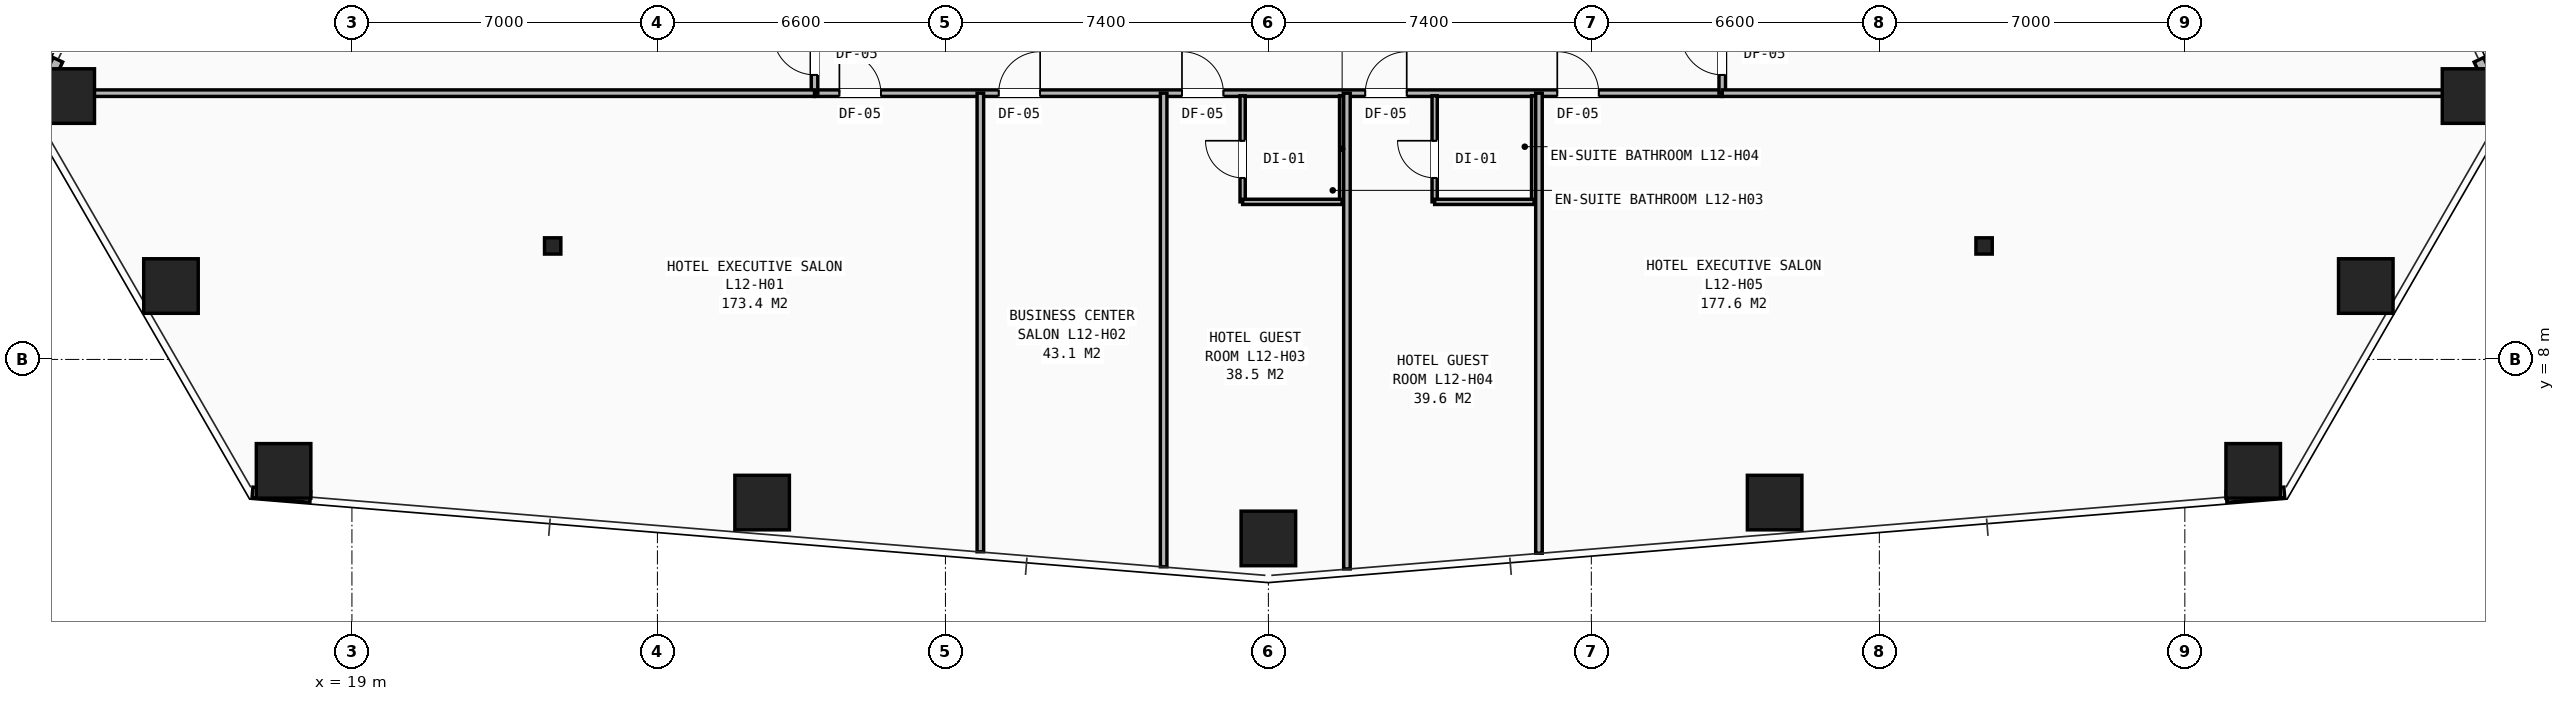
"""IFC4 building model, lengths in metres.
Left out: names, types, materials, properties, quantities, classifications, styles, units other than length and angle.
Written with IfcOpenShell. Run it as: python <this file> out.ifc"""

import sys

from ifc_helpers import new_model, si_unit, direction, frame, frame_2d, origin, origin_2d, place, context, subcontext, project, spatial, rectangle, hollow_rectangle, i_section, extrude, element, fill, save


model = new_model("IFC4")
c1 = context("Model", 3, precision=1e-05, world=origin(), true_north=direction((0.0, 1.0)))
c2 = subcontext(c1, "Body", "Model", "MODEL_VIEW")
j1 = project(units=[si_unit("LENGTHUNIT", "METRE"), si_unit("PLANEANGLEUNIT", "RADIAN")], contexts=[c1])
p1 = place(None, origin())
s1 = spatial("IfcSite", under=j1, at=p1, CompositionType="ELEMENT")
p2 = place(p1, origin())
s2 = spatial("IfcBuilding", under=s1, at=p2, CompositionType="ELEMENT")
p3 = place(p2, frame((0.0, 0.0, 46.4)))
s3 = spatial("IfcBuildingStorey", under=s2, at=p3, CompositionType="ELEMENT", Elevation=46.4)
for number, where, z_axis, x_axis in (
    (1, (23.6, 10.6, 0.0), (0.0, 0.0, 1.0), (1.0, 0.0, 0.0)),
    (2, (56.4, 10.6, 0.0), (0.0, 0.0, 1.0), (1.0, 0.0, 0.0)),
):
    element("IfcColumn", number, at=place(p3, frame(where, z_axis=z_axis, x_axis=x_axis)), inside=s3, PredefinedType="COLUMN", context=c2, shape_type="SweptSolid", body=[
        extrude(i_section(OverallWidth=0.374, OverallDepth=0.372, WebThickness=0.016, FlangeThickness=0.026, at=origin_2d()), origin(), (0.0, 0.0, 1.0), 3.2),
    ])
for number, where, z_axis, x_axis in (
    (3, (12.476, 14.033, 0.0), (0.0, 0.0, 1.0), (1.0, 0.0, 0.0)),
    (4, (14.853, 9.681, 0.0), (0.0, 0.0, 1.0), (1.0, 0.0, 0.0)),
    (5, (17.434, 5.447, 0.0), (0.0, 0.0, 1.0), (1.0, 0.0, 0.0)),
    (6, (28.399, 4.721, 0.0), (0.0, 0.0, 1.0), (1.0, 0.0, 0.0)),
    (7, (40.0, 3.899, 0.0), (0.0, 0.0, 1.0), (1.0, 0.0, 0.0)),
    (8, (51.601, 4.721, 0.0), (0.0, 0.0, 1.0), (1.0, 0.0, 0.0)),
    (9, (62.566, 5.447, 0.0), (0.0, 0.0, 1.0), (1.0, 0.0, 0.0)),
    (10, (65.147, 9.681, 0.0), (0.0, 0.0, 1.0), (1.0, 0.0, 0.0)),
    (11, (67.524, 14.033, 0.0), (0.0, 0.0, 1.0), (1.0, 0.0, 0.0)),
):
    element("IfcColumn", number, at=place(p3, frame(where, z_axis=z_axis, x_axis=x_axis)), inside=s3, PredefinedType="COLUMN", context=c2, shape_type="SweptSolid", body=[
        extrude(hollow_rectangle(XDim=1.25, YDim=1.25, WallThickness=0.08, at=origin_2d()), origin(), (0.0, 0.0, 1.0), 3.2),
    ])
p4 = place(p3, frame((12.263, 14.864, 0.0), z_axis=(0.0, 0.0, 1.0), x_axis=(-0.427644283084, -0.903947104175, 0.0)))
e12 = element("IfcWall", 12, at=p4, inside=s3, PredefinedType="SHEAR", context=c2, shape_type="SweptSolid", body=[
    extrude(rectangle(XDim=1.33, YDim=0.24, at=frame_2d((0.665, 0.0))), origin(), (0.0, 0.0, 1.0), 2.263),
])
for number, where, z_axis, x_axis in (
    (13, (16.721, 4.955, 0.0), (0.0, 0.0, 1.0), (0.997, -0.082, 0.0)),
    (14, (61.954, 4.847, 0.0), (0.0, 0.0, 1.0), (0.997, 0.082, 0.0)),
):
    element("IfcWall", number, at=place(p3, frame(where, z_axis=z_axis, x_axis=x_axis)), inside=s3, PredefinedType="SHEAR", context=c2, shape_type="SweptSolid", body=[
        extrude(rectangle(XDim=1.329, YDim=0.24, at=frame_2d((0.665, 0.0))), origin(), (0.0, 0.0, 1.0), 2.263),
    ])
p5 = place(p3, frame((68.306, 13.662, 0.0), z_axis=(0.0, 0.0, 1.0), x_axis=(-0.427644283084, 0.903947104175, 0.0)))
e15 = element("IfcWall", 15, at=p5, inside=s3, PredefinedType="SHEAR", context=c2, shape_type="SweptSolid", body=[
    extrude(rectangle(XDim=1.33, YDim=0.24, at=frame_2d((0.665, 0.0))), origin(), (0.0, 0.0, 1.0), 2.263),
])
p6 = place(p3, frame((29.6, 14.1, 0.0), z_axis=(0.0, 0.0, 1.0), x_axis=(1.0, 0.0, 0.0)))
e16 = element("IfcWall", 16, at=p6, inside=s3, PredefinedType="PARTITIONING", context=c2, shape_type="SweptSolid", body=[
    extrude(rectangle(XDim=20.8, YDim=0.15, at=frame_2d((10.4, 0.0))), origin(), (0.0, 0.0, 1.0), 2.431),
])
p7 = place(p6, frame((0.57, 0.0, 0.0)))
e17 = element("IfcOpeningElement", 17, at=p7, cuts=e16, PredefinedType="OPENING", context=c2, shape_type="SweptSolid", body=[
    extrude(rectangle(XDim=0.95, YDim=2.1, at=frame_2d((0.475, 1.05))), frame((0.0, 0.085, 0.0), z_axis=(0.0, -1.0, 0.0), x_axis=(1.0, 0.0, 0.0)), (0.0, 0.0, 1.0), 0.17),
])
p8 = place(p6, frame((4.22, 0.0, 0.0)))
e18 = element("IfcOpeningElement", 18, at=p8, cuts=e16, PredefinedType="OPENING", context=c2, shape_type="SweptSolid", body=[
    extrude(rectangle(XDim=0.95, YDim=2.1, at=frame_2d((0.475, 1.05))), frame((0.0, 0.085, 0.0), z_axis=(0.0, -1.0, 0.0), x_axis=(1.0, 0.0, 0.0)), (0.0, 0.0, 1.0), 0.17),
])
p9 = place(p6, frame((8.42, 0.0, 0.0)))
e19 = element("IfcOpeningElement", 19, at=p9, cuts=e16, PredefinedType="OPENING", context=c2, shape_type="SweptSolid", body=[
    extrude(rectangle(XDim=0.95, YDim=2.1, at=frame_2d((0.475, 1.05))), frame((0.0, 0.085, 0.0), z_axis=(0.0, -1.0, 0.0), x_axis=(1.0, 0.0, 0.0)), (0.0, 0.0, 1.0), 0.17),
])
p10 = place(p6, frame((12.62, 0.0, 0.0)))
e20 = element("IfcOpeningElement", 20, at=p10, cuts=e16, PredefinedType="OPENING", context=c2, shape_type="SweptSolid", body=[
    extrude(rectangle(XDim=0.95, YDim=2.1, at=frame_2d((0.475, 1.05))), frame((0.0, 0.085, 0.0), z_axis=(0.0, -1.0, 0.0), x_axis=(1.0, 0.0, 0.0)), (0.0, 0.0, 1.0), 0.17),
])
p11 = place(p6, frame((17.02, 0.0, 0.0)))
e21 = element("IfcOpeningElement", 21, at=p11, cuts=e16, PredefinedType="OPENING", context=c2, shape_type="SweptSolid", body=[
    extrude(rectangle(XDim=0.95, YDim=2.1, at=frame_2d((0.475, 1.05))), frame((0.0, 0.085, 0.0), z_axis=(0.0, -1.0, 0.0), x_axis=(1.0, 0.0, 0.0)), (0.0, 0.0, 1.0), 0.17),
])
p12 = place(p3, frame((29.6, 14.1, 0.0), z_axis=(0.0, 0.0, 1.0), x_axis=(0.0, 1.0, 0.0)))
e22 = element("IfcWall", 22, at=p12, inside=s3, PredefinedType="PARTITIONING", context=c2, shape_type="SweptSolid", body=[
    extrude(rectangle(XDim=21.9, YDim=0.15, at=frame_2d((10.95, 0.0))), origin(), (0.0, 0.0, 1.0), 2.431),
])
p13 = place(p12, frame((0.42, 0.0, 0.0)))
e23 = element("IfcOpeningElement", 23, at=p13, cuts=e22, PredefinedType="OPENING", context=c2, shape_type="SweptSolid", body=[
    extrude(rectangle(XDim=0.95, YDim=2.1, at=frame_2d((0.475, 1.05))), frame((0.0, 0.085, 0.0), z_axis=(0.0, -1.0, 0.0), x_axis=(1.0, 0.0, 0.0)), (0.0, 0.0, 1.0), 0.17),
])
p14 = place(p12, frame((5.12, 0.0, 0.0)))
e24 = element("IfcOpeningElement", 24, at=p14, cuts=e22, PredefinedType="OPENING", context=c2, shape_type="SweptSolid", body=[
    extrude(rectangle(XDim=0.95, YDim=2.1, at=frame_2d((0.475, 1.05))), frame((0.0, 0.085, 0.0), z_axis=(0.0, -1.0, 0.0), x_axis=(1.0, 0.0, 0.0)), (0.0, 0.0, 1.0), 0.17),
])
p15 = place(p12, frame((10.12, 0.0, 0.0)))
e25 = element("IfcOpeningElement", 25, at=p15, cuts=e22, PredefinedType="OPENING", context=c2, shape_type="SweptSolid", body=[
    extrude(rectangle(XDim=0.95, YDim=2.1, at=frame_2d((0.475, 1.05))), frame((0.0, 0.085, 0.0), z_axis=(0.0, -1.0, 0.0), x_axis=(1.0, 0.0, 0.0)), (0.0, 0.0, 1.0), 0.17),
])
p16 = place(p12, frame((16.12, 0.0, 0.0)))
e26 = element("IfcOpeningElement", 26, at=p16, cuts=e22, PredefinedType="OPENING", context=c2, shape_type="SweptSolid", body=[
    extrude(rectangle(XDim=0.95, YDim=2.1, at=frame_2d((0.475, 1.05))), frame((0.0, 0.085, 0.0), z_axis=(0.0, -1.0, 0.0), x_axis=(1.0, 0.0, 0.0)), (0.0, 0.0, 1.0), 0.17),
])
p17 = place(p3, frame((50.4, 14.1, 0.0), z_axis=(0.0, 0.0, 1.0), x_axis=(0.0, 1.0, 0.0)))
e27 = element("IfcWall", 27, at=p17, inside=s3, PredefinedType="PARTITIONING", context=c2, shape_type="SweptSolid", body=[
    extrude(rectangle(XDim=21.9, YDim=0.15, at=frame_2d((10.95, 0.0))), origin(), (0.0, 0.0, 1.0), 2.431),
])
p18 = place(p17, frame((0.42, 0.0, 0.0)))
e28 = element("IfcOpeningElement", 28, at=p18, cuts=e27, PredefinedType="OPENING", context=c2, shape_type="SweptSolid", body=[
    extrude(rectangle(XDim=0.95, YDim=2.1, at=frame_2d((0.475, 1.05))), frame((0.0, 0.085, 0.0), z_axis=(0.0, -1.0, 0.0), x_axis=(1.0, 0.0, 0.0)), (0.0, 0.0, 1.0), 0.17),
])
p19 = place(p17, frame((5.72, 0.0, 0.0)))
e29 = element("IfcOpeningElement", 29, at=p19, cuts=e27, PredefinedType="OPENING", context=c2, shape_type="SweptSolid", body=[
    extrude(rectangle(XDim=0.95, YDim=2.1, at=frame_2d((0.475, 1.05))), frame((0.0, 0.085, 0.0), z_axis=(0.0, -1.0, 0.0), x_axis=(1.0, 0.0, 0.0)), (0.0, 0.0, 1.0), 0.17),
])
p20 = place(p17, frame((11.12, 0.0, 0.0)))
e30 = element("IfcOpeningElement", 30, at=p20, cuts=e27, PredefinedType="OPENING", context=c2, shape_type="SweptSolid", body=[
    extrude(rectangle(XDim=0.95, YDim=2.1, at=frame_2d((0.475, 1.05))), frame((0.0, 0.085, 0.0), z_axis=(0.0, -1.0, 0.0), x_axis=(1.0, 0.0, 0.0)), (0.0, 0.0, 1.0), 0.17),
])
p21 = place(p17, frame((16.72, 0.0, 0.0)))
e31 = element("IfcOpeningElement", 31, at=p21, cuts=e27, PredefinedType="OPENING", context=c2, shape_type="SweptSolid", body=[
    extrude(rectangle(XDim=0.95, YDim=2.1, at=frame_2d((0.475, 1.05))), frame((0.0, 0.085, 0.0), z_axis=(0.0, -1.0, 0.0), x_axis=(1.0, 0.0, 0.0)), (0.0, 0.0, 1.0), 0.17),
])
p22 = place(p3, frame((33.4, 3.594, 0.0), z_axis=(0.0, 0.0, 1.0), x_axis=(0.0, 1.0, 0.0)))
e32 = element("IfcWall", 32, at=p22, inside=s3, PredefinedType="PARTITIONING", context=c2, shape_type="SweptSolid", body=[
    extrude(rectangle(XDim=10.507, YDim=0.15, at=frame_2d((5.253, 0.0))), origin(), (0.0, 0.0, 1.0), 2.268),
])
p23 = place(p3, frame((37.6, 3.25, 0.0), z_axis=(0.0, 0.0, 1.0), x_axis=(0.0, 1.0, 0.0)))
e33 = element("IfcWall", 33, at=p23, inside=s3, PredefinedType="PARTITIONING", context=c2, shape_type="SweptSolid", body=[
    extrude(rectangle(XDim=10.851, YDim=0.15, at=frame_2d((5.425, 0.0))), origin(), (0.0, 0.0, 1.0), 2.268),
])
p24 = place(p3, frame((39.41, 11.61, 0.0), z_axis=(0.0, 0.0, 1.0), x_axis=(0.0, 1.0, 0.0)))
e34 = element("IfcWall", 34, at=p24, inside=s3, PredefinedType="PARTITIONING", context=c2, shape_type="SweptSolid", body=[
    extrude(rectangle(XDim=2.43, YDim=0.12, at=frame_2d((1.215, 0.0))), origin(), (0.0, 0.0, 1.0), 2.98),
])
p25 = place(p24, frame((0.55, 0.0, 0.0)))
e35 = element("IfcOpeningElement", 35, at=p25, cuts=e34, PredefinedType="OPENING", context=c2, shape_type="SweptSolid", body=[
    extrude(rectangle(XDim=0.85, YDim=2.05, at=frame_2d((0.425, 1.025))), frame((0.0, 0.07, 0.0), z_axis=(0.0, -1.0, 0.0), x_axis=(1.0, 0.0, 0.0)), (0.0, 0.0, 1.0), 0.14),
])
p26 = place(p3, frame((41.69, 11.61, 0.0), z_axis=(0.0, 0.0, 1.0), x_axis=(0.0, 1.0, 0.0)))
e36 = element("IfcWall", 36, at=p26, inside=s3, PredefinedType="PARTITIONING", context=c2, shape_type="SweptSolid", body=[
    extrude(rectangle(XDim=2.43, YDim=0.12, at=frame_2d((1.215, 0.0))), origin(), (0.0, 0.0, 1.0), 2.98),
])
p27 = place(p3, frame((39.41, 11.61, 0.0), z_axis=(0.0, 0.0, 1.0), x_axis=(1.0, 0.0, 0.0)))
e37 = element("IfcWall", 37, at=p27, inside=s3, PredefinedType="PARTITIONING", context=c2, shape_type="SweptSolid", body=[
    extrude(rectangle(XDim=2.28, YDim=0.12, at=frame_2d((1.14, 0.0))), origin(), (0.0, 0.0, 1.0), 2.98),
])
p28 = place(p3, frame((41.8, 3.2, 0.0), z_axis=(0.0, 0.0, 1.0), x_axis=(0.0, 1.0, 0.0)))
e38 = element("IfcWall", 38, at=p28, inside=s3, PredefinedType="PARTITIONING", context=c2, shape_type="SweptSolid", body=[
    extrude(rectangle(XDim=10.9, YDim=0.15, at=frame_2d((5.45, 0.0))), origin(), (0.0, 0.0, 1.0), 2.268),
])
p29 = place(p3, frame((43.81, 11.61, 0.0), z_axis=(0.0, 0.0, 1.0), x_axis=(0.0, 1.0, 0.0)))
e39 = element("IfcWall", 39, at=p29, inside=s3, PredefinedType="PARTITIONING", context=c2, shape_type="SweptSolid", body=[
    extrude(rectangle(XDim=2.43, YDim=0.12, at=frame_2d((1.215, 0.0))), origin(), (0.0, 0.0, 1.0), 2.98),
])
p30 = place(p29, frame((0.55, 0.0, 0.0)))
e40 = element("IfcOpeningElement", 40, at=p30, cuts=e39, PredefinedType="OPENING", context=c2, shape_type="SweptSolid", body=[
    extrude(rectangle(XDim=0.85, YDim=2.05, at=frame_2d((0.425, 1.025))), frame((0.0, 0.07, 0.0), z_axis=(0.0, -1.0, 0.0), x_axis=(1.0, 0.0, 0.0)), (0.0, 0.0, 1.0), 0.14),
])
p31 = place(p3, frame((46.09, 11.61, 0.0), z_axis=(0.0, 0.0, 1.0), x_axis=(0.0, 1.0, 0.0)))
e41 = element("IfcWall", 41, at=p31, inside=s3, PredefinedType="PARTITIONING", context=c2, shape_type="SweptSolid", body=[
    extrude(rectangle(XDim=2.43, YDim=0.12, at=frame_2d((1.215, 0.0))), origin(), (0.0, 0.0, 1.0), 2.98),
])
p32 = place(p3, frame((43.81, 11.61, 0.0), z_axis=(0.0, 0.0, 1.0), x_axis=(1.0, 0.0, 0.0)))
e42 = element("IfcWall", 42, at=p32, inside=s3, PredefinedType="PARTITIONING", context=c2, shape_type="SweptSolid", body=[
    extrude(rectangle(XDim=2.28, YDim=0.12, at=frame_2d((1.14, 0.0))), origin(), (0.0, 0.0, 1.0), 2.98),
])
p33 = place(p3, frame((46.2, 3.561, 0.0), z_axis=(0.0, 0.0, 1.0), x_axis=(0.0, 1.0, 0.0)))
e43 = element("IfcWall", 43, at=p33, inside=s3, PredefinedType="PARTITIONING", context=c2, shape_type="SweptSolid", body=[
    extrude(rectangle(XDim=10.539, YDim=0.15, at=frame_2d((5.27, 0.0))), origin(), (0.0, 0.0, 1.0), 2.268),
])
for number, where, z_axis, x_axis in (
    (44, (11.906, 14.1, 0.0), (0.0, 0.0, 1.0), (1.0, 0.0, 0.0)),
    (45, (50.4, 14.1, 0.0), (0.0, 0.0, 1.0), (1.0, 0.0, 0.0)),
):
    element("IfcWall", number, at=place(p3, frame(where, z_axis=z_axis, x_axis=x_axis)), inside=s3, PredefinedType="PARTITIONING", context=c2, shape_type="SweptSolid", body=[
        extrude(rectangle(XDim=17.694, YDim=0.15, at=frame_2d((8.847, 0.0))), origin(), (0.0, 0.0, 1.0), 2.268),
    ])
p34 = place(p7, origin())
e46 = element("IfcDoor", 46, at=p34, inside=s3, OperationType="SINGLE_SWING_LEFT", PredefinedType="DOOR", context=c2, shape_type="SweptSolid", body=[
    extrude(rectangle(XDim=0.95, YDim=2.1, at=frame_2d((0.475, 1.05))), frame((0.0, 0.025, 0.0), z_axis=(0.0, -1.0, 0.0), x_axis=(1.0, 0.0, 0.0)), (0.0, 0.0, 1.0), 0.05),
])
fill(e17, e46)
p35 = place(p8, origin())
e47 = element("IfcDoor", 47, at=p35, inside=s3, OperationType="SINGLE_SWING_RIGHT", PredefinedType="DOOR", context=c2, shape_type="SweptSolid", body=[
    extrude(rectangle(XDim=0.95, YDim=2.1, at=frame_2d((0.475, 1.05))), frame((0.0, 0.025, 0.0), z_axis=(0.0, -1.0, 0.0), x_axis=(1.0, 0.0, 0.0)), (0.0, 0.0, 1.0), 0.05),
])
fill(e18, e47)
p36 = place(p9, origin())
e48 = element("IfcDoor", 48, at=p36, inside=s3, OperationType="SINGLE_SWING_LEFT", PredefinedType="DOOR", context=c2, shape_type="SweptSolid", body=[
    extrude(rectangle(XDim=0.95, YDim=2.1, at=frame_2d((0.475, 1.05))), frame((0.0, 0.025, 0.0), z_axis=(0.0, -1.0, 0.0), x_axis=(1.0, 0.0, 0.0)), (0.0, 0.0, 1.0), 0.05),
])
fill(e19, e48)
p37 = place(p25, origin())
e49 = element("IfcDoor", 49, at=p37, inside=s3, OperationType="SINGLE_SWING_RIGHT", PredefinedType="DOOR", context=c2, shape_type="SweptSolid", body=[
    extrude(rectangle(XDim=0.85, YDim=2.05, at=frame_2d((0.425, 1.025))), frame((0.0, 0.025, 0.0), z_axis=(0.0, -1.0, 0.0), x_axis=(1.0, 0.0, 0.0)), (0.0, 0.0, 1.0), 0.05),
])
fill(e35, e49)
p38 = place(p10, origin())
e50 = element("IfcDoor", 50, at=p38, inside=s3, OperationType="SINGLE_SWING_RIGHT", PredefinedType="DOOR", context=c2, shape_type="SweptSolid", body=[
    extrude(rectangle(XDim=0.95, YDim=2.1, at=frame_2d((0.475, 1.05))), frame((0.0, 0.025, 0.0), z_axis=(0.0, -1.0, 0.0), x_axis=(1.0, 0.0, 0.0)), (0.0, 0.0, 1.0), 0.05),
])
fill(e20, e50)
p39 = place(p30, origin())
e51 = element("IfcDoor", 51, at=p39, inside=s3, OperationType="SINGLE_SWING_RIGHT", PredefinedType="DOOR", context=c2, shape_type="SweptSolid", body=[
    extrude(rectangle(XDim=0.85, YDim=2.05, at=frame_2d((0.425, 1.025))), frame((0.0, 0.025, 0.0), z_axis=(0.0, -1.0, 0.0), x_axis=(1.0, 0.0, 0.0)), (0.0, 0.0, 1.0), 0.05),
])
fill(e40, e51)
p40 = place(p11, origin())
e52 = element("IfcDoor", 52, at=p40, inside=s3, OperationType="SINGLE_SWING_LEFT", PredefinedType="DOOR", context=c2, shape_type="SweptSolid", body=[
    extrude(rectangle(XDim=0.95, YDim=2.1, at=frame_2d((0.475, 1.05))), frame((0.0, 0.025, 0.0), z_axis=(0.0, -1.0, 0.0), x_axis=(1.0, 0.0, 0.0)), (0.0, 0.0, 1.0), 0.05),
])
fill(e21, e52)
p41 = place(p13, origin())
e53 = element("IfcDoor", 53, at=p41, inside=s3, OperationType="SINGLE_SWING_RIGHT", PredefinedType="DOOR", context=c2, shape_type="SweptSolid", body=[
    extrude(rectangle(XDim=0.95, YDim=2.1, at=frame_2d((0.475, 1.05))), frame((0.0, 0.025, 0.0), z_axis=(0.0, -1.0, 0.0), x_axis=(1.0, 0.0, 0.0)), (0.0, 0.0, 1.0), 0.05),
])
fill(e23, e53)
p42 = place(p18, origin())
e54 = element("IfcDoor", 54, at=p42, inside=s3, OperationType="SINGLE_SWING_RIGHT", PredefinedType="DOOR", context=c2, shape_type="SweptSolid", body=[
    extrude(rectangle(XDim=0.95, YDim=2.1, at=frame_2d((0.475, 1.05))), frame((0.0, 0.025, 0.0), z_axis=(0.0, -1.0, 0.0), x_axis=(1.0, 0.0, 0.0)), (0.0, 0.0, 1.0), 0.05),
])
fill(e28, e54)
save(model, sys.argv[1])
